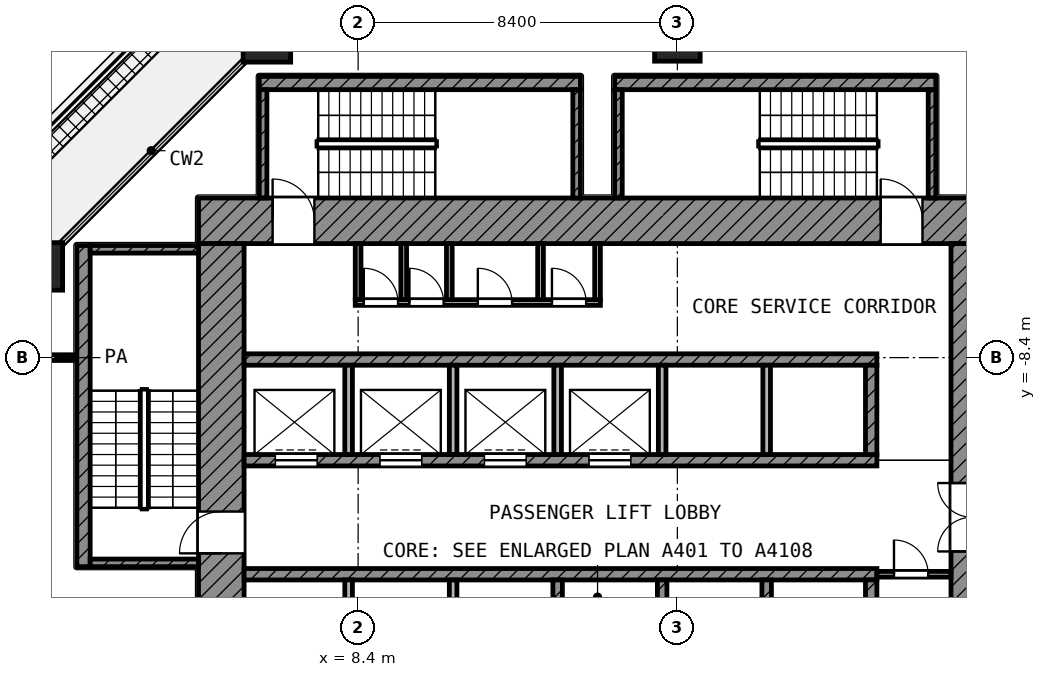
"""IFC4 building model, lengths in metres.
Left out: names, types, materials, properties, quantities, classifications, styles, units other than length and angle.
Written with IfcOpenShell. Run it as: python <this file> out.ifc"""

import sys

from ifc_helpers import new_model, si_unit, direction, frame, frame_2d, origin, origin_2d, place, context, subcontext, project, spatial, rectangle, extrude, element, fill, save


model = new_model("IFC4")
c1 = context("Model", 3, precision=1e-05, world=origin(), true_north=direction((0.0, 1.0)))
c2 = subcontext(c1, "Body", "Model", "MODEL_VIEW")
j1 = project(units=[si_unit("LENGTHUNIT", "METRE"), si_unit("PLANEANGLEUNIT", "RADIAN")], contexts=[c1])
p1 = place(None, origin())
s1 = spatial("IfcSite", under=j1, at=p1, CompositionType="ELEMENT")
p2 = place(p1, origin())
s2 = spatial("IfcBuilding", under=s1, at=p2, CompositionType="ELEMENT")
p3 = place(p2, frame((0.0, 0.0, 56.0)))
s3 = spatial("IfcBuildingStorey", under=s2, at=p3, CompositionType="ELEMENT", Elevation=56.0)
p4 = place(p3, frame((6.0, 0.0, 0.0), z_axis=(0.0, 0.0, 1.0), x_axis=(1.0, 0.0, 0.0)))
e1 = element("IfcColumn", 1, at=p4, inside=s3, PredefinedType="COLUMN", context=c2, shape_type="SweptSolid", body=[
    extrude(rectangle(XDim=1.25, YDim=1.25, at=origin_2d()), origin(), (0.0, 0.0, 1.0), 4.2),
])
p5 = place(p3, frame((16.8, 0.0, 0.0), z_axis=(0.0, 0.0, 1.0), x_axis=(1.0, 0.0, 0.0)))
e2 = element("IfcColumn", 2, at=p5, inside=s3, PredefinedType="COLUMN", context=c2, shape_type="SweptSolid", body=[
    extrude(rectangle(XDim=1.2, YDim=1.2, at=origin_2d()), origin(), (0.0, 0.0, 1.0), 4.2),
])
p6 = place(p3, frame((0.0, -6.0, 0.0), z_axis=(0.0, 0.0, 1.0), x_axis=(1.0, 0.0, 0.0)))
e3 = element("IfcColumn", 3, at=p6, inside=s3, PredefinedType="COLUMN", context=c2, shape_type="SweptSolid", body=[
    extrude(rectangle(XDim=1.25, YDim=1.25, at=origin_2d()), origin(), (0.0, 0.0, 1.0), 4.2),
])
p7 = place(p3, frame((4.2, -4.8, 0.0), z_axis=(0.0, 0.0, 1.0), x_axis=(1.0, 0.0, 0.0)))
e4 = element("IfcWall", 4, at=p7, inside=s3, PredefinedType="SHEAR", context=c2, shape_type="SweptSolid", body=[
    extrude(rectangle(XDim=20.9, YDim=1.2, at=frame_2d((10.45, 0.0))), origin(), (0.0, 0.0, 1.0), 3.9),
])
p8 = place(p7, frame((1.95, 0.0, 0.0)))
e5 = element("IfcOpeningElement", 5, at=p8, cuts=e4, PredefinedType="OPENING", context=c2, shape_type="SweptSolid", body=[
    extrude(rectangle(XDim=1.1, YDim=2.1, at=frame_2d((0.55, 1.05))), frame((0.0, 0.61, 0.0), z_axis=(0.0, -1.0, 0.0), x_axis=(1.0, 0.0, 0.0)), (0.0, 0.0, 1.0), 1.22),
])
p9 = place(p7, frame((17.95, 0.0, 0.0)))
e6 = element("IfcOpeningElement", 6, at=p9, cuts=e4, PredefinedType="OPENING", context=c2, shape_type="SweptSolid", body=[
    extrude(rectangle(XDim=1.1, YDim=2.1, at=frame_2d((0.55, 1.05))), frame((0.0, 0.61, 0.0), z_axis=(0.0, -1.0, 0.0), x_axis=(1.0, 0.0, 0.0)), (0.0, 0.0, 1.0), 1.22),
])
p10 = place(p3, frame((4.8, -25.1, 0.0), z_axis=(0.0, 0.0, 1.0), x_axis=(0.0, 1.0, 0.0)))
e7 = element("IfcWall", 7, at=p10, inside=s3, PredefinedType="SHEAR", context=c2, shape_type="SweptSolid", body=[
    extrude(rectangle(XDim=19.7, YDim=1.2, at=frame_2d((9.85, 0.0))), origin(), (0.0, 0.0, 1.0), 3.9),
])
p11 = place(p10, frame((11.55, 0.0, 0.0)))
e8 = element("IfcOpeningElement", 8, at=p11, cuts=e7, PredefinedType="OPENING", context=c2, shape_type="SweptSolid", body=[
    extrude(rectangle(XDim=1.1, YDim=2.1, at=frame_2d((0.55, 1.05))), frame((0.0, 0.61, 0.0), z_axis=(0.0, -1.0, 0.0), x_axis=(1.0, 0.0, 0.0)), (0.0, 0.0, 1.0), 1.22),
])
p12 = place(p10, frame((2.25, 0.0, 0.0)))
e9 = element("IfcOpeningElement", 9, at=p12, cuts=e7, PredefinedType="OPENING", context=c2, shape_type="SweptSolid", body=[
    extrude(rectangle(XDim=1.1, YDim=2.1, at=frame_2d((0.55, 1.05))), frame((0.0, 0.61, 0.0), z_axis=(0.0, -1.0, 0.0), x_axis=(1.0, 0.0, 0.0)), (0.0, 0.0, 1.0), 1.22),
])
p13 = place(p3, frame((24.55, -24.0, 0.0), z_axis=(0.0, 0.0, 1.0), x_axis=(0.0, 1.0, 0.0)))
e10 = element("IfcWall", 10, at=p13, inside=s3, PredefinedType="SHEAR", context=c2, shape_type="SweptSolid", body=[
    extrude(rectangle(XDim=18.6, YDim=1.1, at=frame_2d((9.3, 0.0))), origin(), (0.0, 0.0, 1.0), 3.9),
])
p14 = place(p13, frame((10.5, 0.0, 0.0)))
e11 = element("IfcOpeningElement", 11, at=p14, cuts=e10, PredefinedType="OPENING", context=c2, shape_type="SweptSolid", body=[
    extrude(rectangle(XDim=1.8, YDim=2.1, at=frame_2d((0.9, 1.05))), frame((0.0, 0.56, 0.0), z_axis=(0.0, -1.0, 0.0), x_axis=(1.0, 0.0, 0.0)), (0.0, 0.0, 1.0), 1.12),
])
p15 = place(p3, frame((5.4, -8.45, 0.0), z_axis=(0.0, 0.0, 1.0), x_axis=(1.0, 0.0, 0.0)))
e12 = element("IfcWall", 12, at=p15, inside=s3, PredefinedType="SHEAR", context=c2, shape_type="SweptSolid", body=[
    extrude(rectangle(XDim=16.65, YDim=0.3, at=frame_2d((8.325, 0.0))), origin(), (0.0, 0.0, 1.0), 3.9),
])
p16 = place(p3, frame((5.4, -11.1, 0.0), z_axis=(0.0, 0.0, 1.0), x_axis=(1.0, 0.0, 0.0)))
e13 = element("IfcWall", 13, at=p16, inside=s3, PredefinedType="SHEAR", context=c2, shape_type="SweptSolid", body=[
    extrude(rectangle(XDim=16.65, YDim=0.3, at=frame_2d((8.325, 0.0))), origin(), (0.0, 0.0, 1.0), 3.9),
])
p17 = place(p16, frame((0.825, 0.0, 0.0)))
e14 = element("IfcOpeningElement", 14, at=p17, cuts=e13, PredefinedType="OPENING", context=c2, shape_type="SweptSolid", body=[
    extrude(rectangle(XDim=1.1, YDim=2.1, at=frame_2d((0.55, 1.05))), frame((0.0, 0.16, 0.0), z_axis=(0.0, -1.0, 0.0), x_axis=(1.0, 0.0, 0.0)), (0.0, 0.0, 1.0), 0.32),
])
p18 = place(p16, frame((3.575, 0.0, 0.0)))
e15 = element("IfcOpeningElement", 15, at=p18, cuts=e13, PredefinedType="OPENING", context=c2, shape_type="SweptSolid", body=[
    extrude(rectangle(XDim=1.1, YDim=2.1, at=frame_2d((0.55, 1.05))), frame((0.0, 0.16, 0.0), z_axis=(0.0, -1.0, 0.0), x_axis=(1.0, 0.0, 0.0)), (0.0, 0.0, 1.0), 0.32),
])
p19 = place(p16, frame((6.325, 0.0, 0.0)))
e16 = element("IfcOpeningElement", 16, at=p19, cuts=e13, PredefinedType="OPENING", context=c2, shape_type="SweptSolid", body=[
    extrude(rectangle(XDim=1.1, YDim=2.1, at=frame_2d((0.55, 1.05))), frame((0.0, 0.16, 0.0), z_axis=(0.0, -1.0, 0.0), x_axis=(1.0, 0.0, 0.0)), (0.0, 0.0, 1.0), 0.32),
])
p20 = place(p16, frame((9.075, 0.0, 0.0)))
e17 = element("IfcOpeningElement", 17, at=p20, cuts=e13, PredefinedType="OPENING", context=c2, shape_type="SweptSolid", body=[
    extrude(rectangle(XDim=1.1, YDim=2.1, at=frame_2d((0.55, 1.05))), frame((0.0, 0.16, 0.0), z_axis=(0.0, -1.0, 0.0), x_axis=(1.0, 0.0, 0.0)), (0.0, 0.0, 1.0), 0.32),
])
p21 = place(p3, frame((5.4, -14.1, 0.0), z_axis=(0.0, 0.0, 1.0), x_axis=(1.0, 0.0, 0.0)))
e18 = element("IfcWall", 18, at=p21, inside=s3, PredefinedType="SHEAR", context=c2, shape_type="SweptSolid", body=[
    extrude(rectangle(XDim=16.65, YDim=0.3, at=frame_2d((8.325, 0.0))), origin(), (0.0, 0.0, 1.0), 3.9),
])
p22 = place(p3, frame((21.9, -10.95, 0.0), z_axis=(0.0, 0.0, 1.0), x_axis=(0.0, 1.0, 0.0)))
e19 = element("IfcWall", 19, at=p22, inside=s3, PredefinedType="SHEAR", context=c2, shape_type="SweptSolid", body=[
    extrude(rectangle(XDim=2.35, YDim=0.3, at=frame_2d((1.175, 0.0))), origin(), (0.0, 0.0, 1.0), 3.9),
])
p23 = place(p3, frame((21.9, -16.6, 0.0), z_axis=(0.0, 0.0, 1.0), x_axis=(0.0, 1.0, 0.0)))
e20 = element("IfcWall", 20, at=p23, inside=s3, PredefinedType="SHEAR", context=c2, shape_type="SweptSolid", body=[
    extrude(rectangle(XDim=2.35, YDim=0.3, at=frame_2d((1.175, 0.0))), origin(), (0.0, 0.0, 1.0), 3.9),
])
for number, where, z_axis, x_axis in (
    (21, (8.15, -10.95, 0.0), (0.0, 0.0, 1.0), (0.0, 1.0, 0.0)),
    (22, (10.9, -10.95, 0.0), (0.0, 0.0, 1.0), (0.0, 1.0, 0.0)),
    (23, (13.65, -10.95, 0.0), (0.0, 0.0, 1.0), (0.0, 1.0, 0.0)),
    (24, (16.4, -10.95, 0.0), (0.0, 0.0, 1.0), (0.0, 1.0, 0.0)),
    (25, (19.15, -10.95, 0.0), (0.0, 0.0, 1.0), (0.0, 1.0, 0.0)),
):
    element("IfcWall", number, at=place(p3, frame(where, z_axis=z_axis, x_axis=x_axis)), inside=s3, PredefinedType="PARTITIONING", context=c2, shape_type="SweptSolid", body=[
        extrude(rectangle(XDim=2.35, YDim=0.2, at=frame_2d((1.175, 0.0))), origin(), (0.0, 0.0, 1.0), 3.9),
    ])
for number, where, z_axis, x_axis in (
    (26, (8.15, -16.6, 0.0), (0.0, 0.0, 1.0), (0.0, 1.0, 0.0)),
    (27, (10.9, -16.6, 0.0), (0.0, 0.0, 1.0), (0.0, 1.0, 0.0)),
):
    element("IfcWall", number, at=place(p3, frame(where, z_axis=z_axis, x_axis=x_axis)), inside=s3, PredefinedType="PARTITIONING", context=c2, shape_type="SweptSolid", body=[
        extrude(rectangle(XDim=2.35, YDim=0.2, at=frame_2d((1.175, 0.0))), origin(), (0.0, 0.0, 1.0), 3.9),
    ])
for number, where, z_axis, x_axis in (
    (28, (13.65, -16.6, 0.0), (0.0, 0.0, 1.0), (0.0, 1.0, 0.0)),
    (29, (16.4, -16.6, 0.0), (0.0, 0.0, 1.0), (0.0, 1.0, 0.0)),
    (30, (19.15, -16.6, 0.0), (0.0, 0.0, 1.0), (0.0, 1.0, 0.0)),
):
    element("IfcWall", number, at=place(p3, frame(where, z_axis=z_axis, x_axis=x_axis)), inside=s3, PredefinedType="SHEAR", context=c2, shape_type="SweptSolid", body=[
        extrude(rectangle(XDim=2.35, YDim=0.25, at=frame_2d((1.175, 0.0))), origin(), (0.0, 0.0, 1.0), 3.9),
    ])
p24 = place(p3, frame((22.05, -14.1, 0.0), z_axis=(0.0, 0.0, 1.0), x_axis=(1.0, 0.0, 0.0)))
e31 = element("IfcWall", 31, at=p24, inside=s3, PredefinedType="PARTITIONING", context=c2, shape_type="SweptSolid", body=[
    extrude(rectangle(XDim=1.95, YDim=0.15, at=frame_2d((0.975, 0.0))), origin(), (0.0, 0.0, 1.0), 3.9),
])
p25 = place(p24, frame((0.45, 0.0, 0.0)))
e32 = element("IfcOpeningElement", 32, at=p25, cuts=e31, PredefinedType="OPENING", context=c2, shape_type="SweptSolid", body=[
    extrude(rectangle(XDim=0.9, YDim=2.1, at=frame_2d((0.45, 1.05))), frame((0.0, 0.085, 0.0), z_axis=(0.0, -1.0, 0.0), x_axis=(1.0, 0.0, 0.0)), (0.0, 0.0, 1.0), 0.17),
])
p26 = place(p3, frame((8.325, -6.95, 0.0), z_axis=(0.0, 0.0, 1.0), x_axis=(1.0, 0.0, 0.0)))
e33 = element("IfcWall", 33, at=p26, inside=s3, PredefinedType="PARTITIONING", context=c2, shape_type="SweptSolid", body=[
    extrude(rectangle(XDim=6.45, YDim=0.15, at=frame_2d((3.225, 0.0))), origin(), (0.0, 0.0, 1.0), 3.9),
])
p27 = place(p26, frame((0.225, 0.0, 0.0)))
e34 = element("IfcOpeningElement", 34, at=p27, cuts=e33, PredefinedType="OPENING", context=c2, shape_type="SweptSolid", body=[
    extrude(rectangle(XDim=0.9, YDim=2.1, at=frame_2d((0.45, 1.05))), frame((0.0, 0.085, 0.0), z_axis=(0.0, -1.0, 0.0), x_axis=(1.0, 0.0, 0.0)), (0.0, 0.0, 1.0), 0.17),
])
p28 = place(p26, frame((1.425, 0.0, 0.0)))
e35 = element("IfcOpeningElement", 35, at=p28, cuts=e33, PredefinedType="OPENING", context=c2, shape_type="SweptSolid", body=[
    extrude(rectangle(XDim=0.9, YDim=2.1, at=frame_2d((0.45, 1.05))), frame((0.0, 0.085, 0.0), z_axis=(0.0, -1.0, 0.0), x_axis=(1.0, 0.0, 0.0)), (0.0, 0.0, 1.0), 0.17),
])
p29 = place(p26, frame((3.225, 0.0, 0.0)))
e36 = element("IfcOpeningElement", 36, at=p29, cuts=e33, PredefinedType="OPENING", context=c2, shape_type="SweptSolid", body=[
    extrude(rectangle(XDim=0.9, YDim=2.1, at=frame_2d((0.45, 1.05))), frame((0.0, 0.085, 0.0), z_axis=(0.0, -1.0, 0.0), x_axis=(1.0, 0.0, 0.0)), (0.0, 0.0, 1.0), 0.17),
])
p30 = place(p26, frame((5.175, 0.0, 0.0)))
e37 = element("IfcOpeningElement", 37, at=p30, cuts=e33, PredefinedType="OPENING", context=c2, shape_type="SweptSolid", body=[
    extrude(rectangle(XDim=0.9, YDim=2.1, at=frame_2d((0.45, 1.05))), frame((0.0, 0.085, 0.0), z_axis=(0.0, -1.0, 0.0), x_axis=(1.0, 0.0, 0.0)), (0.0, 0.0, 1.0), 0.17),
])
for number, where, z_axis, x_axis in (
    (38, (8.4, -6.875, 0.0), (0.0, 0.0, 1.0), (0.0, 1.0, 0.0)),
    (39, (9.6, -6.875, 0.0), (0.0, 0.0, 1.0), (0.0, 1.0, 0.0)),
    (40, (10.8, -6.875, 0.0), (0.0, 0.0, 1.0), (0.0, 1.0, 0.0)),
    (41, (13.2, -6.875, 0.0), (0.0, 0.0, 1.0), (0.0, 1.0, 0.0)),
    (42, (14.7, -6.875, 0.0), (0.0, 0.0, 1.0), (0.0, 1.0, 0.0)),
):
    element("IfcWall", number, at=place(p3, frame(where, z_axis=z_axis, x_axis=x_axis)), inside=s3, PredefinedType="PARTITIONING", context=c2, shape_type="SweptSolid", body=[
        extrude(rectangle(XDim=1.475, YDim=0.15, at=frame_2d((0.738, 0.0))), origin(), (0.0, 0.0, 1.0), 3.9),
    ])
p31 = place(p3, frame((1.175, -13.9, 0.0), z_axis=(0.0, 0.0, 1.0), x_axis=(0.0, 1.0, 0.0)))
e43 = element("IfcWall", 43, at=p31, inside=s3, PredefinedType="SHEAR", context=c2, shape_type="SweptSolid", body=[
    extrude(rectangle(XDim=8.45, YDim=0.35, at=frame_2d((4.225, 0.0))), origin(), (0.0, 0.0, 1.0), 3.9),
])
for number, where, z_axis, x_axis in (
    (44, (1.35, -5.55, 0.0), (0.0, 0.0, 1.0), (1.0, 0.0, 0.0)),
    (45, (1.35, -13.8, 0.0), (0.0, 0.0, 1.0), (1.0, 0.0, 0.0)),
):
    element("IfcWall", number, at=place(p3, frame(where, z_axis=z_axis, x_axis=x_axis)), inside=s3, PredefinedType="SHEAR", context=c2, shape_type="SweptSolid", body=[
        extrude(rectangle(XDim=2.85, YDim=0.2, at=frame_2d((1.425, 0.0))), origin(), (0.0, 0.0, 1.0), 3.9),
    ])
p32 = place(p3, frame((5.8, -1.175, 0.0), z_axis=(0.0, 0.0, 1.0), x_axis=(1.0, 0.0, 0.0)))
e46 = element("IfcWall", 46, at=p32, inside=s3, PredefinedType="SHEAR", context=c2, shape_type="SweptSolid", body=[
    extrude(rectangle(XDim=8.45, YDim=0.35, at=frame_2d((4.225, 0.0))), origin(), (0.0, 0.0, 1.0), 3.9),
])
for number, where, z_axis, x_axis in (
    (47, (5.9, -4.2, 0.0), (0.0, 0.0, 1.0), (0.0, 1.0, 0.0)),
    (48, (14.15, -4.2, 0.0), (0.0, 0.0, 1.0), (0.0, 1.0, 0.0)),
):
    element("IfcWall", number, at=place(p3, frame(where, z_axis=z_axis, x_axis=x_axis)), inside=s3, PredefinedType="SHEAR", context=c2, shape_type="SweptSolid", body=[
        extrude(rectangle(XDim=2.85, YDim=0.2, at=frame_2d((1.425, 0.0))), origin(), (0.0, 0.0, 1.0), 3.9),
    ])
p33 = place(p3, frame((15.15, -1.175, 0.0), z_axis=(0.0, 0.0, 1.0), x_axis=(1.0, 0.0, 0.0)))
e49 = element("IfcWall", 49, at=p33, inside=s3, PredefinedType="SHEAR", context=c2, shape_type="SweptSolid", body=[
    extrude(rectangle(XDim=8.45, YDim=0.35, at=frame_2d((4.225, 0.0))), origin(), (0.0, 0.0, 1.0), 3.9),
])
for number, where, z_axis, x_axis in (
    (50, (15.25, -4.2, 0.0), (0.0, 0.0, 1.0), (0.0, 1.0, 0.0)),
    (51, (23.5, -4.2, 0.0), (0.0, 0.0, 1.0), (0.0, 1.0, 0.0)),
):
    element("IfcWall", number, at=place(p3, frame(where, z_axis=z_axis, x_axis=x_axis)), inside=s3, PredefinedType="SHEAR", context=c2, shape_type="SweptSolid", body=[
        extrude(rectangle(XDim=2.85, YDim=0.2, at=frame_2d((1.425, 0.0))), origin(), (0.0, 0.0, 1.0), 3.9),
    ])
p34 = place(p3, frame((0.08, -8.4, 0.0), z_axis=(0.0, 0.0, 1.0), x_axis=(1.0, 0.0, 0.0)))
e52 = element("IfcWall", 52, at=p34, inside=s3, PredefinedType="PARTITIONING", context=c2, shape_type="SweptSolid", body=[
    extrude(rectangle(XDim=0.89, YDim=0.15, at=frame_2d((0.445, 0.0))), origin(), (0.0, 0.0, 1.0), 3.9),
])
p35 = place(p17, origin())
e53 = element("IfcDoor", 53, at=p35, inside=s3, OperationType="DOUBLE_DOOR_SLIDING", PredefinedType="DOOR", context=c2, shape_type="SweptSolid", body=[
    extrude(rectangle(XDim=1.1, YDim=2.1, at=frame_2d((0.55, 1.05))), frame((0.0, 0.025, 0.0), z_axis=(0.0, -1.0, 0.0), x_axis=(1.0, 0.0, 0.0)), (0.0, 0.0, 1.0), 0.05),
])
fill(e14, e53)
p36 = place(p18, origin())
e54 = element("IfcDoor", 54, at=p36, inside=s3, OperationType="DOUBLE_DOOR_SLIDING", PredefinedType="DOOR", context=c2, shape_type="SweptSolid", body=[
    extrude(rectangle(XDim=1.1, YDim=2.1, at=frame_2d((0.55, 1.05))), frame((0.0, 0.025, 0.0), z_axis=(0.0, -1.0, 0.0), x_axis=(1.0, 0.0, 0.0)), (0.0, 0.0, 1.0), 0.05),
])
fill(e15, e54)
p37 = place(p19, origin())
e55 = element("IfcDoor", 55, at=p37, inside=s3, OperationType="DOUBLE_DOOR_SLIDING", PredefinedType="DOOR", context=c2, shape_type="SweptSolid", body=[
    extrude(rectangle(XDim=1.1, YDim=2.1, at=frame_2d((0.55, 1.05))), frame((0.0, 0.025, 0.0), z_axis=(0.0, -1.0, 0.0), x_axis=(1.0, 0.0, 0.0)), (0.0, 0.0, 1.0), 0.05),
])
fill(e16, e55)
p38 = place(p20, origin())
e56 = element("IfcDoor", 56, at=p38, inside=s3, OperationType="DOUBLE_DOOR_SLIDING", PredefinedType="DOOR", context=c2, shape_type="SweptSolid", body=[
    extrude(rectangle(XDim=1.1, YDim=2.1, at=frame_2d((0.55, 1.05))), frame((0.0, 0.025, 0.0), z_axis=(0.0, -1.0, 0.0), x_axis=(1.0, 0.0, 0.0)), (0.0, 0.0, 1.0), 0.05),
])
fill(e17, e56)
p39 = place(p11, origin())
e57 = element("IfcDoor", 57, at=p39, inside=s3, OperationType="SINGLE_SWING_LEFT", PredefinedType="DOOR", context=c2, shape_type="SweptSolid", body=[
    extrude(rectangle(XDim=1.1, YDim=2.1, at=frame_2d((0.55, 1.05))), frame((0.0, 0.025, 0.0), z_axis=(0.0, -1.0, 0.0), x_axis=(1.0, 0.0, 0.0)), (0.0, 0.0, 1.0), 0.05),
])
fill(e8, e57)
p40 = place(p8, origin())
e58 = element("IfcDoor", 58, at=p40, inside=s3, OperationType="SINGLE_SWING_LEFT", PredefinedType="DOOR", context=c2, shape_type="SweptSolid", body=[
    extrude(rectangle(XDim=1.1, YDim=2.1, at=frame_2d((0.55, 1.05))), frame((0.0, 0.025, 0.0), z_axis=(0.0, -1.0, 0.0), x_axis=(1.0, 0.0, 0.0)), (0.0, 0.0, 1.0), 0.05),
])
fill(e5, e58)
p41 = place(p9, origin())
e59 = element("IfcDoor", 59, at=p41, inside=s3, OperationType="SINGLE_SWING_LEFT", PredefinedType="DOOR", context=c2, shape_type="SweptSolid", body=[
    extrude(rectangle(XDim=1.1, YDim=2.1, at=frame_2d((0.55, 1.05))), frame((0.0, 0.025, 0.0), z_axis=(0.0, -1.0, 0.0), x_axis=(1.0, 0.0, 0.0)), (0.0, 0.0, 1.0), 0.05),
])
fill(e6, e59)
p42 = place(p27, origin())
e60 = element("IfcDoor", 60, at=p42, inside=s3, OperationType="SINGLE_SWING_LEFT", PredefinedType="DOOR", context=c2, shape_type="SweptSolid", body=[
    extrude(rectangle(XDim=0.9, YDim=2.1, at=frame_2d((0.45, 1.05))), frame((0.0, 0.025, 0.0), z_axis=(0.0, -1.0, 0.0), x_axis=(1.0, 0.0, 0.0)), (0.0, 0.0, 1.0), 0.05),
])
fill(e34, e60)
p43 = place(p28, origin())
e61 = element("IfcDoor", 61, at=p43, inside=s3, OperationType="SINGLE_SWING_LEFT", PredefinedType="DOOR", context=c2, shape_type="SweptSolid", body=[
    extrude(rectangle(XDim=0.9, YDim=2.1, at=frame_2d((0.45, 1.05))), frame((0.0, 0.025, 0.0), z_axis=(0.0, -1.0, 0.0), x_axis=(1.0, 0.0, 0.0)), (0.0, 0.0, 1.0), 0.05),
])
fill(e35, e61)
p44 = place(p29, origin())
e62 = element("IfcDoor", 62, at=p44, inside=s3, OperationType="SINGLE_SWING_LEFT", PredefinedType="DOOR", context=c2, shape_type="SweptSolid", body=[
    extrude(rectangle(XDim=0.9, YDim=2.1, at=frame_2d((0.45, 1.05))), frame((0.0, 0.025, 0.0), z_axis=(0.0, -1.0, 0.0), x_axis=(1.0, 0.0, 0.0)), (0.0, 0.0, 1.0), 0.05),
])
fill(e36, e62)
p45 = place(p30, origin())
e63 = element("IfcDoor", 63, at=p45, inside=s3, OperationType="SINGLE_SWING_LEFT", PredefinedType="DOOR", context=c2, shape_type="SweptSolid", body=[
    extrude(rectangle(XDim=0.9, YDim=2.1, at=frame_2d((0.45, 1.05))), frame((0.0, 0.025, 0.0), z_axis=(0.0, -1.0, 0.0), x_axis=(1.0, 0.0, 0.0)), (0.0, 0.0, 1.0), 0.05),
])
fill(e37, e63)
p46 = place(p25, origin())
e64 = element("IfcDoor", 64, at=p46, inside=s3, OperationType="SINGLE_SWING_LEFT", PredefinedType="DOOR", context=c2, shape_type="SweptSolid", body=[
    extrude(rectangle(XDim=0.9, YDim=2.1, at=frame_2d((0.45, 1.05))), frame((0.0, 0.025, 0.0), z_axis=(0.0, -1.0, 0.0), x_axis=(1.0, 0.0, 0.0)), (0.0, 0.0, 1.0), 0.05),
])
fill(e32, e64)
save(model, sys.argv[1])
